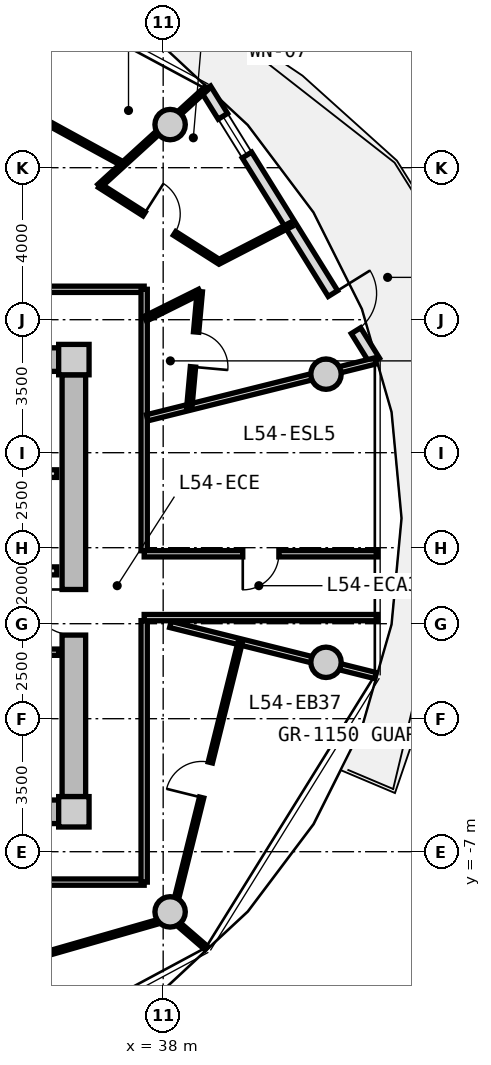
"""IFC4 building model, lengths in metres.
Left out: names, types, materials, properties, quantities, classifications, styles, units other than length and angle.
Written with IfcOpenShell. Run it as: python <this file> out.ifc"""

import sys

from ifc_helpers import new_model, si_unit, direction, frame, frame_2d, origin, origin_2d, place, context, subcontext, project, spatial, rectangle, circle, extrude, source, transform, mapped, element, fill, save


model = new_model("IFC4")
c1 = context("Model", 3, precision=1e-05, world=origin(), true_north=direction((0.0, 1.0)))
c2 = subcontext(c1, "Body", "Model", "MODEL_VIEW")
j1 = project(units=[si_unit("LENGTHUNIT", "METRE"), si_unit("PLANEANGLEUNIT", "RADIAN")], contexts=[c1])
p1 = place(None, origin())
s1 = spatial("IfcSite", under=j1, at=p1, CompositionType="ELEMENT")
p2 = place(p1, origin())
s2 = spatial("IfcBuilding", under=s1, at=p2, CompositionType="ELEMENT")
p3 = place(p2, frame((0.0, 0.0, 173.95)))
s3 = spatial("IfcBuildingStorey", under=s2, at=p3, CompositionType="ELEMENT", Elevation=173.95)
m1 = source(origin(), c2, "Body", "SweptSolid", [
    extrude(rectangle(XDim=0.8, YDim=0.8, at=origin_2d()), origin(), (0.0, 0.0, 1.0), 3.05),
])
for number, where, z_axis, x_axis in (
    (1, (35.65, -5.95, 0.0), (0.0, 0.0, 1.0), (1.0, 0.0, 0.0)),
    (2, (35.65, 5.95, 0.0), (0.0, 0.0, 1.0), (1.0, 0.0, 0.0)),
):
    element("IfcColumn", number, at=place(p3, frame(where, z_axis=z_axis, x_axis=x_axis)), inside=s3, PredefinedType="COLUMN", context=c2, shape_type="MappedRepresentation", body=[
        mapped(m1, transform((0.0, 0.0, 0.0), x_axis=(1.0, 0.0, 0.0), y_axis=(0.0, 1.0, 0.0), z_axis=(0.0, 0.0, 1.0), scale=1.0)),
    ])
m2 = source(origin(), c2, "Body", "SweptSolid", [
    extrude(rectangle(XDim=14.5, YDim=0.62, at=frame_2d((7.25, 0.0))), origin(), (0.0, 0.0, 1.0), 2.81),
])
for number, where, z_axis, x_axis in (
    (3, (20.75, 5.95, 0.0), (0.0, 0.0, 1.0), (1.0, 0.0, 0.0)),
    (4, (35.25, -5.95, 0.0), (0.0, 0.0, 1.0), (-1.0, 0.0, 0.0)),
):
    element("IfcWall", number, at=place(p3, frame(where, z_axis=z_axis, x_axis=x_axis)), inside=s3, PredefinedType="SHEAR", context=c2, shape_type="MappedRepresentation", body=[
        mapped(m2, transform((0.0, 0.0, 0.0), x_axis=(1.0, 0.0, 0.0), y_axis=(0.0, 1.0, 0.0), z_axis=(0.0, 0.0, 1.0), scale=1.0)),
    ])
m3 = source(origin(), c2, "Body", "SweptSolid", [
    extrude(rectangle(XDim=11.1, YDim=0.62, at=frame_2d((5.55, 0.0))), origin(), (0.0, 0.0, 1.0), 2.81),
])
p4 = place(p3, frame((35.65, 5.55, 0.0), z_axis=(0.0, 0.0, 1.0), x_axis=(0.0, -1.0, 0.0)))
e5 = element("IfcWall", 5, at=p4, inside=s3, PredefinedType="SHEAR", context=c2, shape_type="MappedRepresentation", body=[
    mapped(m3, transform((0.0, 0.0, 0.0), x_axis=(1.0, 0.0, 0.0), y_axis=(0.0, 1.0, 0.0), z_axis=(0.0, 0.0, 1.0), scale=1.0)),
])
p5 = place(p4, frame((5.65, 0.0, 0.0)))
e6 = element("IfcOpeningElement", 6, at=p5, cuts=e5, PredefinedType="OPENING", context=c2, shape_type="SweptSolid", body=[
    extrude(rectangle(XDim=1.2, YDim=2.15, at=frame_2d((0.6, 1.075))), frame((0.0, 0.32, 0.0), z_axis=(0.0, -1.0, 0.0), x_axis=(1.0, 0.0, 0.0)), (0.0, 0.0, 1.0), 0.64),
])
m4 = source(origin(), c2, "Body", "SweptSolid", [
    extrude(circle(Radius=0.4, at=origin_2d()), origin(), (0.0, 0.0, 1.0), 3.05),
])
for number, where, z_axis, x_axis in (
    (7, (42.285, 5.567, 0.0), (0.0, 0.0, 1.0), (1.0, 0.0, 0.0)),
    (8, (38.183, 12.135, 0.0), (0.0, 0.0, 1.0), (1.0, 0.0, 0.0)),
    (9, (38.183, -8.584, 0.0), (0.0, 0.0, 1.0), (1.0, 0.0, 0.0)),
    (10, (42.285, -2.016, 0.0), (0.0, 0.0, 1.0), (1.0, 0.0, 0.0)),
):
    element("IfcColumn", number, at=place(p3, frame(where, z_axis=z_axis, x_axis=x_axis)), inside=s3, PredefinedType="COLUMN", context=c2, shape_type="MappedRepresentation", body=[
        mapped(m4, transform((0.0, 0.0, 0.0), x_axis=(1.0, 0.0, 0.0), y_axis=(0.0, 1.0, 0.0), z_axis=(0.0, 0.0, 1.0), scale=1.0)),
    ])
m5 = source(origin(), c2, "Body", "SweptSolid", [
    extrude(rectangle(XDim=8.431, YDim=0.29, at=frame_2d((4.216, 0.0))), origin(), (0.0, 0.0, 1.0), 2.81),
])
p6 = place(p3, frame((39.123, 13.075, 0.0), z_axis=(0.0, 0.0, 1.0), x_axis=(0.527377998418, -0.849630770855, 0.0)))
e11 = element("IfcWall", 11, at=p6, inside=s3, PredefinedType="SOLIDWALL", context=c2, shape_type="MappedRepresentation", body=[
    mapped(m5, transform((0.0, 0.0, 0.0), x_axis=(1.0, 0.0, 0.0), y_axis=(0.0, 1.0, 0.0), z_axis=(0.0, 0.0, 1.0), scale=1.0)),
])
p7 = place(p6, frame((6.34, 0.0, 0.0)))
e12 = element("IfcOpeningElement", 12, at=p7, cuts=e11, PredefinedType="OPENING", context=c2, shape_type="SweptSolid", body=[
    extrude(rectangle(XDim=1.15, YDim=2.25, at=frame_2d((0.575, 1.125))), frame((0.0, 0.155, 0.0), z_axis=(0.0, -1.0, 0.0), x_axis=(1.0, 0.0, 0.0)), (0.0, 0.0, 1.0), 0.31),
])
p8 = place(p6, frame((0.85, 0.0, 0.85)))
e13 = element("IfcOpeningElement", 13, at=p8, cuts=e11, PredefinedType="OPENING", context=c2, shape_type="SweptSolid", body=[
    extrude(rectangle(XDim=1.2, YDim=1.5, at=frame_2d((0.6, 0.75))), frame((0.0, 0.155, 0.0), z_axis=(0.0, -1.0, 0.0), x_axis=(1.0, 0.0, 0.0)), (0.0, 0.0, 1.0), 0.31),
])
m6 = source(origin(), c2, "Body", "SweptSolid", [
    extrude(rectangle(XDim=3.2, YDim=0.2, at=frame_2d((1.6, 0.0))), origin(), (0.0, 0.0, 1.0), 2.795),
])
p9 = place(p3, frame((32.0, 2.95, 0.0), z_axis=(0.0, 0.0, 1.0), x_axis=(1.0, 0.0, 0.0)))
e14 = element("IfcWall", 14, at=p9, inside=s3, PredefinedType="PARTITIONING", context=c2, shape_type="MappedRepresentation", body=[
    mapped(m6, transform((0.0, 0.0, 0.0), x_axis=(1.0, 0.0, 0.0), y_axis=(0.0, 1.0, 0.0), z_axis=(0.0, 0.0, 1.0), scale=1.0)),
])
m7 = source(origin(), c2, "Body", "SweptSolid", [
    extrude(rectangle(XDim=6.66, YDim=0.21, at=frame_2d((3.33, 0.0))), origin(), (0.0, 0.0, 1.0), 2.795),
])
p10 = place(p3, frame((28.54, 0.39, 0.0), z_axis=(0.0, 0.0, 1.0), x_axis=(1.0, 0.0, 0.0)))
e15 = element("IfcWall", 15, at=p10, inside=s3, PredefinedType="PARTITIONING", context=c2, shape_type="MappedRepresentation", body=[
    mapped(m7, transform((0.0, 0.0, 0.0), x_axis=(1.0, 0.0, 0.0), y_axis=(0.0, 1.0, 0.0), z_axis=(0.0, 0.0, 1.0), scale=1.0)),
])
p11 = place(p10, frame((1.0, 0.0, 0.0)))
e16 = element("IfcOpeningElement", 16, at=p11, cuts=e15, PredefinedType="OPENING", context=c2, shape_type="SweptSolid", body=[
    extrude(rectangle(XDim=1.2, YDim=2.15, at=frame_2d((0.6, 1.075))), frame((0.0, 0.115, 0.0), z_axis=(0.0, -1.0, 0.0), x_axis=(1.0, 0.0, 0.0)), (0.0, 0.0, 1.0), 0.23),
])
m8 = source(origin(), c2, "Body", "SweptSolid", [
    extrude(rectangle(XDim=2.7, YDim=0.165, at=frame_2d((1.35, 0.0))), origin(), (0.0, 0.0, 1.0), 2.795),
])
p12 = place(p3, frame((32.55, -1.75, 0.0), z_axis=(0.0, 0.0, 1.0), x_axis=(1.0, 0.0, 0.0)))
e17 = element("IfcWall", 17, at=p12, inside=s3, PredefinedType="PARTITIONING", context=c2, shape_type="MappedRepresentation", body=[
    mapped(m8, transform((0.0, 0.0, 0.0), x_axis=(1.0, 0.0, 0.0), y_axis=(0.0, 1.0, 0.0), z_axis=(0.0, 0.0, 1.0), scale=1.0)),
])
p13 = place(p12, frame((0.85, 0.0, 0.0)))
e18 = element("IfcOpeningElement", 18, at=p13, cuts=e17, PredefinedType="OPENING", context=c2, shape_type="SweptSolid", body=[
    extrude(rectangle(XDim=0.925, YDim=2.1, at=frame_2d((0.462, 1.05))), frame((0.0, 0.093, 0.0), z_axis=(0.0, -1.0, 0.0), x_axis=(1.0, 0.0, 0.0)), (0.0, 0.0, 1.0), 0.185),
])
m9 = source(origin(), c2, "Body", "SweptSolid", [
    extrude(rectangle(XDim=8.719, YDim=0.165, at=frame_2d((4.36, 0.0))), origin(), (0.0, 0.0, 1.0), 2.795),
])
p14 = place(p3, frame((28.781, 7.8, 0.0), z_axis=(0.0, 0.0, 1.0), x_axis=(1.0, 0.0, 0.0)))
e19 = element("IfcWall", 19, at=p14, inside=s3, PredefinedType="PARTITIONING", context=c2, shape_type="MappedRepresentation", body=[
    mapped(m9, transform((0.0, 0.0, 0.0), x_axis=(1.0, 0.0, 0.0), y_axis=(0.0, 1.0, 0.0), z_axis=(0.0, 0.0, 1.0), scale=1.0)),
])
p15 = place(p14, frame((3.835, 0.0, 0.0)))
e20 = element("IfcOpeningElement", 20, at=p15, cuts=e19, PredefinedType="OPENING", context=c2, shape_type="SweptSolid", body=[
    extrude(rectangle(XDim=1.05, YDim=2.15, at=frame_2d((0.525, 1.075))), frame((0.0, 0.093, 0.0), z_axis=(0.0, -1.0, 0.0), x_axis=(1.0, 0.0, 0.0)), (0.0, 0.0, 1.0), 0.185),
])
m10 = source(origin(), c2, "Body", "SweptSolid", [
    extrude(rectangle(XDim=19.0, YDim=0.165, at=frame_2d((9.5, 0.0))), origin(), (0.0, 0.0, 1.0), 2.795),
])
p16 = place(p3, frame((37.5, -7.8, 0.0), z_axis=(0.0, 0.0, 1.0), x_axis=(-1.0, 0.0, 0.0)))
e21 = element("IfcWall", 21, at=p16, inside=s3, PredefinedType="PARTITIONING", context=c2, shape_type="MappedRepresentation", body=[
    mapped(m10, transform((0.0, 0.0, 0.0), x_axis=(1.0, 0.0, 0.0), y_axis=(0.0, 1.0, 0.0), z_axis=(0.0, 0.0, 1.0), scale=1.0)),
])
p17 = place(p16, frame((8.061, 0.0, 0.0)))
e22 = element("IfcOpeningElement", 22, at=p17, cuts=e21, PredefinedType="OPENING", context=c2, shape_type="SweptSolid", body=[
    extrude(rectangle(XDim=1.05, YDim=2.15, at=frame_2d((0.525, 1.075))), frame((0.0, 0.093, 0.0), z_axis=(0.0, -1.0, 0.0), x_axis=(1.0, 0.0, 0.0)), (0.0, 0.0, 1.0), 0.185),
])
m11 = source(origin(), c2, "Body", "SweptSolid", [
    extrude(rectangle(XDim=6.88, YDim=0.165, at=frame_2d((3.44, 0.0))), origin(), (0.0, 0.0, 1.0), 2.795),
])
for number, where, z_axis, x_axis in (
    (23, (37.5, 7.8, 0.0), (0.0, 0.0, 1.0), (0.0, -1.0, 0.0)),
    (24, (37.5, -0.92, 0.0), (0.0, 0.0, 1.0), (0.0, -1.0, 0.0)),
):
    element("IfcWall", number, at=place(p3, frame(where, z_axis=z_axis, x_axis=x_axis)), inside=s3, PredefinedType="PARTITIONING", context=c2, shape_type="MappedRepresentation", body=[
        mapped(m11, transform((0.0, 0.0, 0.0), x_axis=(1.0, 0.0, 0.0), y_axis=(0.0, 1.0, 0.0), z_axis=(0.0, 0.0, 1.0), scale=1.0)),
    ])
m12 = source(origin(), c2, "Body", "SweptSolid", [
    extrude(rectangle(XDim=5.564, YDim=0.165, at=frame_2d((2.782, 0.0))), origin(), (0.0, 0.0, 1.0), 2.345),
])
p18 = place(p3, frame((38.19, -1.02, 0.0), z_axis=(0.0, 0.0, 1.0), x_axis=(0.97031260977, -0.241854169533, 0.0)))
e25 = element("IfcWall", 25, at=p18, inside=s3, PredefinedType="PARTITIONING", context=c2, shape_type="MappedRepresentation", body=[
    mapped(m12, transform((0.0, 0.0, 0.0), x_axis=(1.0, 0.0, 0.0), y_axis=(0.0, 1.0, 0.0), z_axis=(0.0, 0.0, 1.0), scale=1.0)),
])
m13 = source(origin(), c2, "Body", "SweptSolid", [
    extrude(rectangle(XDim=6.193, YDim=0.165, at=frame_2d((3.096, 0.0))), origin(), (0.0, 0.0, 1.0), 2.345),
])
p19 = place(p3, frame((37.58, 4.419, 0.0), z_axis=(0.0, 0.0, 1.0), x_axis=(0.970309243466, 0.241867674657, 0.0)))
e26 = element("IfcWall", 26, at=p19, inside=s3, PredefinedType="PARTITIONING", context=c2, shape_type="MappedRepresentation", body=[
    mapped(m13, transform((0.0, 0.0, 0.0), x_axis=(1.0, 0.0, 0.0), y_axis=(0.0, 1.0, 0.0), z_axis=(0.0, 0.0, 1.0), scale=1.0)),
])
m14 = source(origin(), c2, "Body", "SweptSolid", [
    extrude(rectangle(XDim=6.139, YDim=0.165, at=frame_2d((3.069, 0.0))), origin(), (0.0, 0.0, 1.0), 2.795),
])
p20 = place(p3, frame((37.5, 0.84, 0.0), z_axis=(0.0, 0.0, 1.0), x_axis=(1.0, 0.0, 0.0)))
e27 = element("IfcWall", 27, at=p20, inside=s3, PredefinedType="PARTITIONING", context=c2, shape_type="MappedRepresentation", body=[
    mapped(m14, transform((0.0, 0.0, 0.0), x_axis=(1.0, 0.0, 0.0), y_axis=(0.0, 1.0, 0.0), z_axis=(0.0, 0.0, 1.0), scale=1.0)),
])
p21 = place(p20, frame((2.594, 0.0, 0.0)))
e28 = element("IfcOpeningElement", 28, at=p21, cuts=e27, PredefinedType="OPENING", context=c2, shape_type="SweptSolid", body=[
    extrude(rectangle(XDim=0.95, YDim=2.1, at=frame_2d((0.475, 1.05))), frame((0.0, 0.093, 0.0), z_axis=(0.0, -1.0, 0.0), x_axis=(1.0, 0.0, 0.0)), (0.0, 0.0, 1.0), 0.185),
])
p22 = place(p3, frame((43.639, -0.84, 0.0), z_axis=(0.0, 0.0, 1.0), x_axis=(-1.0, 0.0, 0.0)))
e29 = element("IfcWall", 29, at=p22, inside=s3, PredefinedType="PARTITIONING", context=c2, shape_type="MappedRepresentation", body=[
    mapped(m14, transform((0.0, 0.0, 0.0), x_axis=(1.0, 0.0, 0.0), y_axis=(0.0, 1.0, 0.0), z_axis=(0.0, 0.0, 1.0), scale=1.0)),
])
m15 = source(origin(), c2, "Body", "SweptSolid", [
    extrude(rectangle(XDim=7.167, YDim=0.115, at=frame_2d((3.583, 0.0))), origin(), (0.0, 0.0, 1.0), 2.795),
])
p23 = place(p3, frame((36.939, 11.098, 0.0), z_axis=(0.0, 0.0, 1.0), x_axis=(-0.8771628907, 0.480192943699, 0.0)))
e30 = element("IfcWall", 30, at=p23, inside=s3, PredefinedType="PARTITIONING", context=c2, shape_type="MappedRepresentation", body=[
    mapped(m15, transform((0.0, 0.0, 0.0), x_axis=(1.0, 0.0, 0.0), y_axis=(0.0, 1.0, 0.0), z_axis=(0.0, 0.0, 1.0), scale=1.0)),
])
p24 = place(p23, frame((3.108, 0.0, 0.0)))
e31 = element("IfcOpeningElement", 31, at=p24, cuts=e30, PredefinedType="OPENING", context=c2, shape_type="SweptSolid", body=[
    extrude(rectangle(XDim=0.95, YDim=2.1, at=frame_2d((0.475, 1.05))), frame((0.0, 0.067, 0.0), z_axis=(0.0, -1.0, 0.0), x_axis=(1.0, 0.0, 0.0)), (0.0, 0.0, 1.0), 0.135),
])
m16 = source(origin(), c2, "Body", "SweptSolid", [
    extrude(rectangle(XDim=3.814, YDim=0.115, at=frame_2d((1.907, 0.0))), origin(), (0.0, 0.0, 1.0), 2.345),
])
p25 = place(p3, frame((36.319, 10.518, 0.0), z_axis=(0.0, 0.0, 1.0), x_axis=(0.73871962024, 0.674012850524, 0.0)))
e32 = element("IfcWall", 32, at=p25, inside=s3, PredefinedType="PARTITIONING", context=c2, shape_type="MappedRepresentation", body=[
    mapped(m16, transform((0.0, 0.0, 0.0), x_axis=(1.0, 0.0, 0.0), y_axis=(0.0, 1.0, 0.0), z_axis=(0.0, 0.0, 1.0), scale=1.0)),
])
m17 = source(origin(), c2, "Body", "SweptSolid", [
    extrude(rectangle(XDim=1.601, YDim=0.14, at=frame_2d((0.801, 0.0))), origin(), (0.0, 0.0, 1.0), 2.795),
])
p26 = place(p3, frame((37.53, 7.026, 0.0), z_axis=(0.0, 0.0, 1.0), x_axis=(0.895279369592, 0.445505163138, 0.0)))
e33 = element("IfcWall", 33, at=p26, inside=s3, PredefinedType="PARTITIONING", context=c2, shape_type="MappedRepresentation", body=[
    mapped(m17, transform((0.0, 0.0, 0.0), x_axis=(1.0, 0.0, 0.0), y_axis=(0.0, 1.0, 0.0), z_axis=(0.0, 0.0, 1.0), scale=1.0)),
])
m18 = source(origin(), c2, "Body", "SweptSolid", [
    extrude(rectangle(XDim=3.058, YDim=0.14, at=frame_2d((1.529, 0.0))), origin(), (0.0, 0.0, 1.0), 2.795),
])
p27 = place(p3, frame((38.964, 7.74, 0.0), z_axis=(0.0, 0.0, 1.0), x_axis=(-0.090060616512, -0.99593628579, 0.0)))
e34 = element("IfcWall", 34, at=p27, inside=s3, PredefinedType="PARTITIONING", context=c2, shape_type="MappedRepresentation", body=[
    mapped(m18, transform((0.0, 0.0, 0.0), x_axis=(1.0, 0.0, 0.0), y_axis=(0.0, 1.0, 0.0), z_axis=(0.0, 0.0, 1.0), scale=1.0)),
])
p28 = place(p27, frame((1.069, 0.0, 0.0)))
e35 = element("IfcOpeningElement", 35, at=p28, cuts=e34, PredefinedType="OPENING", context=c2, shape_type="SweptSolid", body=[
    extrude(rectangle(XDim=0.92, YDim=2.1, at=frame_2d((0.46, 1.05))), frame((0.0, 0.08, 0.0), z_axis=(0.0, -1.0, 0.0), x_axis=(1.0, 0.0, 0.0)), (0.0, 0.0, 1.0), 0.16),
])
m19 = source(origin(), c2, "Body", "SweptSolid", [
    extrude(rectangle(XDim=2.13, YDim=0.115, at=frame_2d((1.065, 0.0))), origin(), (0.0, 0.0, 1.0), 2.795),
])
p29 = place(p3, frame((39.471, 8.525, 0.0), z_axis=(0.0, 0.0, 1.0), x_axis=(0.888504584778, 0.458867740016, 0.0)))
e36 = element("IfcWall", 36, at=p29, inside=s3, PredefinedType="PARTITIONING", context=c2, shape_type="MappedRepresentation", body=[
    mapped(m19, transform((0.0, 0.0, 0.0), x_axis=(1.0, 0.0, 0.0), y_axis=(0.0, 1.0, 0.0), z_axis=(0.0, 0.0, 1.0), scale=1.0)),
])
m20 = source(origin(), c2, "Body", "SweptSolid", [
    extrude(rectangle(XDim=3.725, YDim=0.115, at=frame_2d((1.863, 0.0))), origin(), (0.0, 0.0, 1.0), 2.795),
])
p30 = place(p3, frame((39.471, 8.525, 0.0), z_axis=(0.0, 0.0, 1.0), x_axis=(-0.843453635564, 0.537201977523, 0.0)))
e37 = element("IfcWall", 37, at=p30, inside=s3, PredefinedType="PARTITIONING", context=c2, shape_type="MappedRepresentation", body=[
    mapped(m20, transform((0.0, 0.0, 0.0), x_axis=(1.0, 0.0, 0.0), y_axis=(0.0, 1.0, 0.0), z_axis=(0.0, 0.0, 1.0), scale=1.0)),
])
p31 = place(p30, frame((1.388, 0.0, 0.0)))
e38 = element("IfcOpeningElement", 38, at=p31, cuts=e37, PredefinedType="OPENING", context=c2, shape_type="SweptSolid", body=[
    extrude(rectangle(XDim=0.95, YDim=2.1, at=frame_2d((0.475, 1.05))), frame((0.0, 0.067, 0.0), z_axis=(0.0, -1.0, 0.0), x_axis=(1.0, 0.0, 0.0)), (0.0, 0.0, 1.0), 0.135),
])
m21 = source(origin(), c2, "Body", "SweptSolid", [
    extrude(rectangle(XDim=7.911, YDim=0.115, at=frame_2d((3.955, 0.0))), origin(), (0.0, 0.0, 1.0), 2.345),
])
p32 = place(p3, frame((30.613, -10.927, 0.0), z_axis=(0.0, 0.0, 1.0), x_axis=(0.961104741235, 0.276184134908, 0.0)))
e39 = element("IfcWall", 39, at=p32, inside=s3, PredefinedType="PARTITIONING", context=c2, shape_type="MappedRepresentation", body=[
    mapped(m21, transform((0.0, 0.0, 0.0), x_axis=(1.0, 0.0, 0.0), y_axis=(0.0, 1.0, 0.0), z_axis=(0.0, 0.0, 1.0), scale=1.0)),
])
p33 = place(p32, frame((3.48, 0.0, 0.0)))
e40 = element("IfcOpeningElement", 40, at=p33, cuts=e39, PredefinedType="OPENING", context=c2, shape_type="SweptSolid", body=[
    extrude(rectangle(XDim=0.95, YDim=2.1, at=frame_2d((0.475, 1.05))), frame((0.0, 0.067, 0.0), z_axis=(0.0, -1.0, 0.0), x_axis=(1.0, 0.0, 0.0)), (0.0, 0.0, 1.0), 0.135),
])
m22 = source(origin(), c2, "Body", "SweptSolid", [
    extrude(rectangle(XDim=7.492, YDim=0.115, at=frame_2d((3.746, 0.0))), origin(), (0.0, 0.0, 1.0), 2.345),
])
p34 = place(p3, frame((38.223, -8.749, 0.0), z_axis=(0.0, 0.0, 1.0), x_axis=(0.24104782819, 0.970513237686, 0.0)))
e41 = element("IfcWall", 41, at=p34, inside=s3, PredefinedType="PARTITIONING", context=c2, shape_type="MappedRepresentation", body=[
    mapped(m22, transform((0.0, 0.0, 0.0), x_axis=(1.0, 0.0, 0.0), y_axis=(0.0, 1.0, 0.0), z_axis=(0.0, 0.0, 1.0), scale=1.0)),
])
p35 = place(p34, frame((3.271, 0.0, 0.0)))
e42 = element("IfcOpeningElement", 42, at=p35, cuts=e41, PredefinedType="OPENING", context=c2, shape_type="SweptSolid", body=[
    extrude(rectangle(XDim=0.95, YDim=2.1, at=frame_2d((0.475, 1.05))), frame((0.0, 0.067, 0.0), z_axis=(0.0, -1.0, 0.0), x_axis=(1.0, 0.0, 0.0)), (0.0, 0.0, 1.0), 0.135),
])
m23 = source(origin(), c2, "Body", "SweptSolid", [
    extrude(rectangle(XDim=1.208, YDim=0.115, at=frame_2d((0.604, 0.0))), origin(), (0.0, 0.0, 1.0), 2.795),
])
p36 = place(p3, frame((38.223, -8.749, 0.0), z_axis=(0.0, 0.0, 1.0), x_axis=(0.75668207681, -0.653783018008, 0.0)))
e43 = element("IfcWall", 43, at=p36, inside=s3, PredefinedType="PARTITIONING", context=c2, shape_type="MappedRepresentation", body=[
    mapped(m23, transform((0.0, 0.0, 0.0), x_axis=(1.0, 0.0, 0.0), y_axis=(0.0, 1.0, 0.0), z_axis=(0.0, 0.0, 1.0), scale=1.0)),
])
m24 = source(origin(), c2, "Body", "SweptSolid", [
    extrude(rectangle(XDim=1.15, YDim=2.25, at=frame_2d((0.575, 1.125))), frame((0.0, 0.025, 0.0), z_axis=(0.0, -1.0, 0.0), x_axis=(1.0, 0.0, 0.0)), (0.0, 0.0, 1.0), 0.05),
])
p37 = place(p7, origin())
e44 = element("IfcDoor", 44, at=p37, inside=s3, OperationType="SINGLE_SWING_LEFT", PredefinedType="DOOR", context=c2, shape_type="MappedRepresentation", body=[
    mapped(m24, transform((0.0, 0.0, 0.0), x_axis=(1.0, 0.0, 0.0), y_axis=(0.0, 1.0, 0.0), z_axis=(0.0, 0.0, 1.0), scale=1.0)),
])
fill(e12, e44)
m25 = source(origin(), c2, "Body", "SweptSolid", [
    extrude(rectangle(XDim=1.2, YDim=1.5, at=frame_2d((0.6, 0.75))), frame((0.0, 0.03, 0.0), z_axis=(0.0, -1.0, 0.0), x_axis=(1.0, 0.0, 0.0)), (0.0, 0.0, 1.0), 0.06),
])
p38 = place(p8, origin())
e45 = element("IfcWindow", 45, at=p38, inside=s3, PartitioningType="SINGLE_PANEL", PredefinedType="WINDOW", context=c2, shape_type="MappedRepresentation", body=[
    mapped(m25, transform((0.0, 0.0, 0.0), x_axis=(1.0, 0.0, 0.0), y_axis=(0.0, 1.0, 0.0), z_axis=(0.0, 0.0, 1.0), scale=1.0)),
])
fill(e13, e45)
m26 = source(origin(), c2, "Body", "SweptSolid", [
    extrude(rectangle(XDim=1.2, YDim=2.15, at=frame_2d((0.6, 1.075))), frame((0.0, 0.025, 0.0), z_axis=(0.0, -1.0, 0.0), x_axis=(1.0, 0.0, 0.0)), (0.0, 0.0, 1.0), 0.05),
])
p39 = place(p5, frame((1.2, 0.0, 0.0), z_axis=(0.0, 0.0, 1.0), x_axis=(-1.0, 0.0, 0.0)))
e46 = element("IfcDoor", 46, at=p39, inside=s3, OperationType="SINGLE_SWING_RIGHT", PredefinedType="DOOR", context=c2, shape_type="MappedRepresentation", body=[
    mapped(m26, transform((0.0, 0.0, 0.0), x_axis=(1.0, 0.0, 0.0), y_axis=(0.0, 1.0, 0.0), z_axis=(0.0, 0.0, 1.0), scale=1.0)),
])
fill(e6, e46)
m27 = source(origin(), c2, "Body", "SweptSolid", [
    extrude(rectangle(XDim=0.95, YDim=2.1, at=frame_2d((0.475, 1.05))), frame((0.0, 0.025, 0.0), z_axis=(0.0, -1.0, 0.0), x_axis=(1.0, 0.0, 0.0)), (0.0, 0.0, 1.0), 0.05),
])
p40 = place(p21, frame((0.95, 0.0, 0.0), z_axis=(0.0, 0.0, 1.0), x_axis=(-1.0, 0.0, 0.0)))
e47 = element("IfcDoor", 47, at=p40, inside=s3, OperationType="SINGLE_SWING_RIGHT", PredefinedType="DOOR", context=c2, shape_type="MappedRepresentation", body=[
    mapped(m27, transform((0.0, 0.0, 0.0), x_axis=(1.0, 0.0, 0.0), y_axis=(0.0, 1.0, 0.0), z_axis=(0.0, 0.0, 1.0), scale=1.0)),
])
fill(e28, e47)
m28 = source(origin(), c2, "Body", "SweptSolid", [
    extrude(rectangle(XDim=0.92, YDim=2.1, at=frame_2d((0.46, 1.05))), frame((0.0, 0.025, 0.0), z_axis=(0.0, -1.0, 0.0), x_axis=(1.0, 0.0, 0.0)), (0.0, 0.0, 1.0), 0.05),
])
p41 = place(p28, origin())
e48 = element("IfcDoor", 48, at=p41, inside=s3, OperationType="SINGLE_SWING_RIGHT", PredefinedType="DOOR", context=c2, shape_type="MappedRepresentation", body=[
    mapped(m28, transform((0.0, 0.0, 0.0), x_axis=(1.0, 0.0, 0.0), y_axis=(0.0, 1.0, 0.0), z_axis=(0.0, 0.0, 1.0), scale=1.0)),
])
fill(e35, e48)
p42 = place(p31, frame((0.95, 0.0, 0.0), z_axis=(0.0, 0.0, 1.0), x_axis=(-1.0, 0.0, 0.0)))
e49 = element("IfcDoor", 49, at=p42, inside=s3, OperationType="SINGLE_SWING_LEFT", PredefinedType="DOOR", context=c2, shape_type="MappedRepresentation", body=[
    mapped(m27, transform((0.0, 0.0, 0.0), x_axis=(1.0, 0.0, 0.0), y_axis=(0.0, 1.0, 0.0), z_axis=(0.0, 0.0, 1.0), scale=1.0)),
])
fill(e38, e49)
p43 = place(p35, origin())
e50 = element("IfcDoor", 50, at=p43, inside=s3, OperationType="SINGLE_SWING_LEFT", PredefinedType="DOOR", context=c2, shape_type="MappedRepresentation", body=[
    mapped(m27, transform((0.0, 0.0, 0.0), x_axis=(1.0, 0.0, 0.0), y_axis=(0.0, 1.0, 0.0), z_axis=(0.0, 0.0, 1.0), scale=1.0)),
])
fill(e42, e50)
save(model, sys.argv[1])
